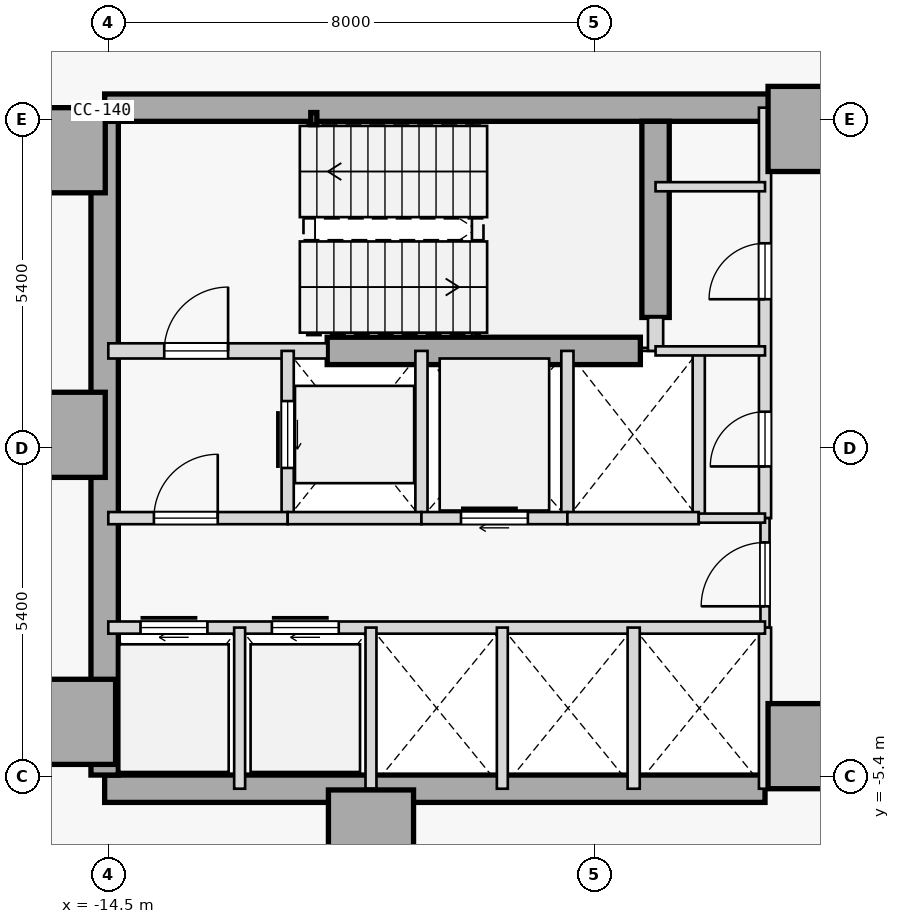
"""IFC4 building model, lengths in metres.
Left out: names, types, materials, properties, quantities, classifications, styles, units other than length and angle.
Written with IfcOpenShell. Run it as: python <this file> out.ifc"""

import sys

from ifc_helpers import new_model, si_unit, direction, frame, frame_2d, origin, origin_2d, place, context, subcontext, project, spatial, rectangle, hollow_rectangle, extrude, element, fill, save


model = new_model("IFC4")
c1 = context("Model", 3, precision=1e-05, world=origin(), true_north=direction((0.0, 1.0)))
c2 = subcontext(c1, "Body", "Model", "MODEL_VIEW")
j1 = project(units=[si_unit("LENGTHUNIT", "METRE"), si_unit("PLANEANGLEUNIT", "RADIAN")], contexts=[c1])
p1 = place(None, origin())
s1 = spatial("IfcSite", under=j1, at=p1, CompositionType="ELEMENT")
p2 = place(p1, origin())
s2 = spatial("IfcBuilding", under=s1, at=p2, CompositionType="ELEMENT")
p3 = place(p2, frame((0.0, 0.0, 59.8)))
s3 = spatial("IfcBuildingStorey", under=s2, at=p3, CompositionType="ELEMENT", Elevation=59.8)
for number, where, z_axis, x_axis in (
    (1, (-15.25, 4.9, 0.0), (0.0, 0.0, 1.0), (1.0, 0.0, 0.0)),
    (2, (-15.25, 0.22, 0.0), (0.0, 0.0, 1.0), (1.0, 0.0, 0.0)),
    (3, (-15.08, -4.5, 0.0), (0.0, 0.0, 1.0), (1.0, 0.0, 0.0)),
    (4, (-10.18, -6.32, 0.0), (0.0, 0.0, 1.0), (1.0, 0.0, 0.0)),
    (5, (-2.95, -4.9, 0.0), (0.0, 0.0, 1.0), (1.0, 0.0, 0.0)),
    (6, (-2.95, 5.25, 0.0), (0.0, 0.0, 1.0), (1.0, 0.0, 0.0)),
):
    element("IfcColumn", number, at=place(p3, frame(where, z_axis=z_axis, x_axis=x_axis)), inside=s3, PredefinedType="COLUMN", context=c2, shape_type="SweptSolid", body=[
        extrude(rectangle(XDim=1.4, YDim=1.4, at=origin_2d()), origin(), (0.0, 0.0, 1.0), 3.8),
    ])
p4 = place(p3, frame((-14.56, 5.6, 0.0), z_axis=(0.0, 0.0, 1.0), x_axis=(1.0, 0.0, 0.0)))
e7 = element("IfcWall", 7, at=p4, inside=s3, PredefinedType="SHEAR", context=c2, shape_type="SweptSolid", body=[
    extrude(rectangle(XDim=11.41, YDim=0.45, at=frame_2d((5.705, 0.0))), origin(), (0.0, 0.0, 1.0), 3.575),
])
p5 = place(p3, frame((-14.56, -5.6, 0.0), z_axis=(0.0, 0.0, 1.0), x_axis=(1.0, 0.0, 0.0)))
e8 = element("IfcWall", 8, at=p5, inside=s3, PredefinedType="SHEAR", context=c2, shape_type="SweptSolid", body=[
    extrude(rectangle(XDim=10.86, YDim=0.45, at=frame_2d((5.43, 0.0))), origin(), (0.0, 0.0, 1.0), 3.575),
])
p6 = place(p3, frame((-14.56, -5.375, 0.0), z_axis=(0.0, 0.0, 1.0), x_axis=(0.0, 1.0, 0.0)))
e9 = element("IfcWall", 9, at=p6, inside=s3, PredefinedType="SHEAR", context=c2, shape_type="SweptSolid", body=[
    extrude(rectangle(XDim=10.75, YDim=0.45, at=frame_2d((5.375, 0.0))), origin(), (0.0, 0.0, 1.0), 3.575),
])
p7 = place(p3, frame((-5.5, 2.15, 0.0), z_axis=(0.0, 0.0, 1.0), x_axis=(0.0, 1.0, 0.0)))
e10 = element("IfcWall", 10, at=p7, inside=s3, PredefinedType="SHEAR", context=c2, shape_type="SweptSolid", body=[
    extrude(rectangle(XDim=3.225, YDim=0.45, at=frame_2d((1.613, 0.0))), origin(), (0.0, 0.0, 1.0), 3.575),
])
p8 = place(p3, frame((-10.9, 1.6, 0.0), z_axis=(0.0, 0.0, 1.0), x_axis=(1.0, 0.0, 0.0)))
e11 = element("IfcWall", 11, at=p8, inside=s3, PredefinedType="SHEAR", context=c2, shape_type="SweptSolid", body=[
    extrude(rectangle(XDim=5.15, YDim=0.45, at=frame_2d((2.575, 0.0))), origin(), (0.0, 0.0, 1.0), 3.575),
])
p9 = place(p3, frame((-11.12, 5.42, 0.0), z_axis=(0.0, 0.0, 1.0), x_axis=(1.0, 0.0, 0.0)))
e12 = element("IfcColumn", 12, at=p9, inside=s3, PredefinedType="COLUMN", context=c2, shape_type="SweptSolid", body=[
    extrude(hollow_rectangle(XDim=0.1, YDim=0.2, WallThickness=0.008, at=origin_2d()), origin(), (0.0, 0.0, 1.0), 3.8),
])
p10 = place(p3, frame((-14.5, 1.6, 0.0), z_axis=(0.0, 0.0, 1.0), x_axis=(1.0, 0.0, 0.0)))
e13 = element("IfcWall", 13, at=p10, inside=s3, PredefinedType="STANDARD", context=c2, shape_type="SweptSolid", body=[
    extrude(rectangle(XDim=3.6, YDim=0.25, at=frame_2d((1.8, 0.0))), origin(), (0.0, 0.0, 1.0), 3.575),
])
p11 = place(p10, frame((0.92, 0.0, 0.0)))
e14 = element("IfcOpeningElement", 14, at=p11, cuts=e13, PredefinedType="OPENING", context=c2, shape_type="SweptSolid", body=[
    extrude(rectangle(XDim=1.05, YDim=2.15, at=frame_2d((0.525, 1.075))), frame((0.0, 0.135, 0.0), z_axis=(0.0, -1.0, 0.0), x_axis=(1.0, 0.0, 0.0)), (0.0, 0.0, 1.0), 0.27),
])
p12 = place(p3, frame((-5.5, 1.6, 0.0), z_axis=(0.0, 0.0, 1.0), x_axis=(0.0, 1.0, 0.0)))
e15 = element("IfcWall", 15, at=p12, inside=s3, PredefinedType="STANDARD", context=c2, shape_type="SweptSolid", body=[
    extrude(rectangle(XDim=0.55, YDim=0.25, at=frame_2d((0.275, 0.0))), origin(), (0.0, 0.0, 1.0), 3.575),
])
p13 = place(p3, frame((-3.7, -1.15, 0.0), z_axis=(0.0, 0.0, 1.0), x_axis=(0.0, 1.0, 0.0)))
e16 = element("IfcWall", 16, at=p13, inside=s3, PredefinedType="STANDARD", context=c2, shape_type="SweptSolid", body=[
    extrude(rectangle(XDim=6.75, YDim=0.2, at=frame_2d((3.375, 0.0))), origin(), (0.0, 0.0, 1.0), 3.575),
])
p14 = place(p13, frame((3.6, 0.0, 0.0)))
e17 = element("IfcOpeningElement", 17, at=p14, cuts=e16, PredefinedType="OPENING", context=c2, shape_type="SweptSolid", body=[
    extrude(rectangle(XDim=0.92, YDim=2.15, at=frame_2d((0.46, 1.075))), frame((0.0, 0.11, 0.0), z_axis=(0.0, -1.0, 0.0), x_axis=(1.0, 0.0, 0.0)), (0.0, 0.0, 1.0), 0.22),
])
p15 = place(p13, frame((0.85, 0.0, 0.0)))
e18 = element("IfcOpeningElement", 18, at=p15, cuts=e16, PredefinedType="OPENING", context=c2, shape_type="SweptSolid", body=[
    extrude(rectangle(XDim=0.9, YDim=2.15, at=frame_2d((0.45, 1.075))), frame((0.0, 0.11, 0.0), z_axis=(0.0, -1.0, 0.0), x_axis=(1.0, 0.0, 0.0)), (0.0, 0.0, 1.0), 0.22),
])
p16 = place(p3, frame((-3.7, -2.95, 0.0), z_axis=(0.0, 0.0, 1.0), x_axis=(0.0, 1.0, 0.0)))
e19 = element("IfcWall", 19, at=p16, inside=s3, PredefinedType="PARTITIONING", context=c2, shape_type="SweptSolid", body=[
    extrude(rectangle(XDim=1.8, YDim=0.15, at=frame_2d((0.9, 0.0))), origin(), (0.0, 0.0, 1.0), 3.575),
])
p17 = place(p16, frame((0.35, 0.0, 0.0)))
e20 = element("IfcOpeningElement", 20, at=p17, cuts=e19, PredefinedType="OPENING", context=c2, shape_type="SweptSolid", body=[
    extrude(rectangle(XDim=1.05, YDim=2.18, at=frame_2d((0.525, 1.09))), frame((0.0, 0.085, 0.0), z_axis=(0.0, -1.0, 0.0), x_axis=(1.0, 0.0, 0.0)), (0.0, 0.0, 1.0), 0.17),
])
p18 = place(p3, frame((-3.7, -5.6, 0.0), z_axis=(0.0, 0.0, 1.0), x_axis=(0.0, 1.0, 0.0)))
e21 = element("IfcWall", 21, at=p18, inside=s3, PredefinedType="STANDARD", context=c2, shape_type="SweptSolid", body=[
    extrude(rectangle(XDim=2.65, YDim=0.2, at=frame_2d((1.325, 0.0))), origin(), (0.0, 0.0, 1.0), 3.575),
])
p19 = place(p3, frame((-11.55, -1.15, 0.0), z_axis=(0.0, 0.0, 1.0), x_axis=(0.0, 1.0, 0.0)))
e22 = element("IfcWall", 22, at=p19, inside=s3, PredefinedType="STANDARD", context=c2, shape_type="SweptSolid", body=[
    extrude(rectangle(XDim=2.75, YDim=0.2, at=frame_2d((1.375, 0.0))), origin(), (0.0, 0.0, 1.0), 3.575),
])
p20 = place(p19, frame((0.825, 0.0, 0.0)))
e23 = element("IfcOpeningElement", 23, at=p20, cuts=e22, PredefinedType="OPENING", context=c2, shape_type="SweptSolid", body=[
    extrude(rectangle(XDim=1.1, YDim=2.15, at=frame_2d((0.55, 1.075))), frame((0.0, 0.11, 0.0), z_axis=(0.0, -1.0, 0.0), x_axis=(1.0, 0.0, 0.0)), (0.0, 0.0, 1.0), 0.22),
])
p21 = place(p3, frame((-9.35, -1.15, 0.0), z_axis=(0.0, 0.0, 1.0), x_axis=(0.0, 1.0, 0.0)))
e24 = element("IfcWall", 24, at=p21, inside=s3, PredefinedType="STANDARD", context=c2, shape_type="SweptSolid", body=[
    extrude(rectangle(XDim=2.75, YDim=0.2, at=frame_2d((1.375, 0.0))), origin(), (0.0, 0.0, 1.0), 3.575),
])
p22 = place(p3, frame((-14.5, -1.15, 0.0), z_axis=(0.0, 0.0, 1.0), x_axis=(1.0, 0.0, 0.0)))
e25 = element("IfcWall", 25, at=p22, inside=s3, PredefinedType="STANDARD", context=c2, shape_type="SweptSolid", body=[
    extrude(rectangle(XDim=2.95, YDim=0.2, at=frame_2d((1.475, 0.0))), origin(), (0.0, 0.0, 1.0), 3.575),
])
p23 = place(p22, frame((0.75, 0.0, 0.0)))
e26 = element("IfcOpeningElement", 26, at=p23, cuts=e25, PredefinedType="OPENING", context=c2, shape_type="SweptSolid", body=[
    extrude(rectangle(XDim=1.05, YDim=2.18, at=frame_2d((0.525, 1.09))), frame((0.0, 0.11, 0.0), z_axis=(0.0, -1.0, 0.0), x_axis=(1.0, 0.0, 0.0)), (0.0, 0.0, 1.0), 0.22),
])
p24 = place(p3, frame((-11.55, -1.15, 0.0), z_axis=(0.0, 0.0, 1.0), x_axis=(1.0, 0.0, 0.0)))
e27 = element("IfcWall", 27, at=p24, inside=s3, PredefinedType="STANDARD", context=c2, shape_type="SweptSolid", body=[
    extrude(rectangle(XDim=2.2, YDim=0.2, at=frame_2d((1.1, 0.0))), origin(), (0.0, 0.0, 1.0), 3.575),
])
p25 = place(p3, frame((-6.95, -1.15, 0.0), z_axis=(0.0, 0.0, 1.0), x_axis=(0.0, 1.0, 0.0)))
e28 = element("IfcWall", 28, at=p25, inside=s3, PredefinedType="STANDARD", context=c2, shape_type="SweptSolid", body=[
    extrude(rectangle(XDim=2.75, YDim=0.2, at=frame_2d((1.375, 0.0))), origin(), (0.0, 0.0, 1.0), 3.575),
])
p26 = place(p3, frame((-9.35, -1.15, 0.0), z_axis=(0.0, 0.0, 1.0), x_axis=(1.0, 0.0, 0.0)))
e29 = element("IfcWall", 29, at=p26, inside=s3, PredefinedType="STANDARD", context=c2, shape_type="SweptSolid", body=[
    extrude(rectangle(XDim=2.4, YDim=0.2, at=frame_2d((1.2, 0.0))), origin(), (0.0, 0.0, 1.0), 3.575),
])
p27 = place(p26, frame((0.65, 0.0, 0.0)))
e30 = element("IfcOpeningElement", 30, at=p27, cuts=e29, PredefinedType="OPENING", context=c2, shape_type="SweptSolid", body=[
    extrude(rectangle(XDim=1.1, YDim=2.15, at=frame_2d((0.55, 1.075))), frame((0.0, 0.11, 0.0), z_axis=(0.0, -1.0, 0.0), x_axis=(1.0, 0.0, 0.0)), (0.0, 0.0, 1.0), 0.22),
])
p28 = place(p3, frame((-4.79, -1.15, 0.0), z_axis=(0.0, 0.0, 1.0), x_axis=(0.0, 1.0, 0.0)))
e31 = element("IfcWall", 31, at=p28, inside=s3, PredefinedType="STANDARD", context=c2, shape_type="SweptSolid", body=[
    extrude(rectangle(XDim=2.75, YDim=0.2, at=frame_2d((1.375, 0.0))), origin(), (0.0, 0.0, 1.0), 3.575),
])
p29 = place(p3, frame((-6.95, -1.15, 0.0), z_axis=(0.0, 0.0, 1.0), x_axis=(1.0, 0.0, 0.0)))
e32 = element("IfcWall", 32, at=p29, inside=s3, PredefinedType="STANDARD", context=c2, shape_type="SweptSolid", body=[
    extrude(rectangle(XDim=2.16, YDim=0.2, at=frame_2d((1.08, 0.0))), origin(), (0.0, 0.0, 1.0), 3.575),
])
p30 = place(p3, frame((-4.79, -1.15, 0.0), z_axis=(0.0, 0.0, 1.0), x_axis=(1.0, 0.0, 0.0)))
e33 = element("IfcWall", 33, at=p30, inside=s3, PredefinedType="PARTITIONING", context=c2, shape_type="SweptSolid", body=[
    extrude(rectangle(XDim=1.09, YDim=0.15, at=frame_2d((0.545, 0.0))), origin(), (0.0, 0.0, 1.0), 3.575),
])
p31 = place(p3, frame((-14.5, -2.95, 0.0), z_axis=(0.0, 0.0, 1.0), x_axis=(1.0, 0.0, 0.0)))
e34 = element("IfcWall", 34, at=p31, inside=s3, PredefinedType="STANDARD", context=c2, shape_type="SweptSolid", body=[
    extrude(rectangle(XDim=10.8, YDim=0.2, at=frame_2d((5.4, 0.0))), origin(), (0.0, 0.0, 1.0), 3.575),
])
p32 = place(p31, frame((0.53, 0.0, 0.0)))
e35 = element("IfcOpeningElement", 35, at=p32, cuts=e34, PredefinedType="OPENING", context=c2, shape_type="SweptSolid", body=[
    extrude(rectangle(XDim=1.1, YDim=2.15, at=frame_2d((0.55, 1.075))), frame((0.0, 0.11, 0.0), z_axis=(0.0, -1.0, 0.0), x_axis=(1.0, 0.0, 0.0)), (0.0, 0.0, 1.0), 0.22),
])
p33 = place(p31, frame((2.69, 0.0, 0.0)))
e36 = element("IfcOpeningElement", 36, at=p33, cuts=e34, PredefinedType="OPENING", context=c2, shape_type="SweptSolid", body=[
    extrude(rectangle(XDim=1.1, YDim=2.15, at=frame_2d((0.55, 1.075))), frame((0.0, 0.11, 0.0), z_axis=(0.0, -1.0, 0.0), x_axis=(1.0, 0.0, 0.0)), (0.0, 0.0, 1.0), 0.22),
])
p34 = place(p3, frame((-5.86, -5.6, 0.0), z_axis=(0.0, 0.0, 1.0), x_axis=(0.0, 1.0, 0.0)))
e37 = element("IfcWall", 37, at=p34, inside=s3, PredefinedType="STANDARD", context=c2, shape_type="SweptSolid", body=[
    extrude(rectangle(XDim=2.65, YDim=0.2, at=frame_2d((1.325, 0.0))), origin(), (0.0, 0.0, 1.0), 3.575),
])
for number, where, z_axis, x_axis in (
    (38, (-12.34, -5.6, 0.0), (0.0, 0.0, 1.0), (0.0, 1.0, 0.0)),
    (39, (-10.18, -5.6, 0.0), (0.0, 0.0, 1.0), (0.0, 1.0, 0.0)),
    (40, (-8.02, -5.6, 0.0), (0.0, 0.0, 1.0), (0.0, 1.0, 0.0)),
):
    element("IfcWall", number, at=place(p3, frame(where, z_axis=z_axis, x_axis=x_axis)), inside=s3, PredefinedType="STANDARD", context=c2, shape_type="SweptSolid", body=[
        extrude(rectangle(XDim=2.65, YDim=0.18, at=frame_2d((1.325, 0.0))), origin(), (0.0, 0.0, 1.0), 3.575),
    ])
for number, where, z_axis, x_axis in (
    (41, (-5.5, 4.3, 0.0), (0.0, 0.0, 1.0), (1.0, 0.0, 0.0)),
    (42, (-5.5, 1.6, 0.0), (0.0, 0.0, 1.0), (1.0, 0.0, 0.0)),
):
    element("IfcWall", number, at=place(p3, frame(where, z_axis=z_axis, x_axis=x_axis)), inside=s3, PredefinedType="PARTITIONING", context=c2, shape_type="SweptSolid", body=[
        extrude(rectangle(XDim=1.8, YDim=0.15, at=frame_2d((0.9, 0.0))), origin(), (0.0, 0.0, 1.0), 3.575),
    ])
p35 = place(p11, origin())
e43 = element("IfcDoor", 43, at=p35, inside=s3, OperationType="SINGLE_SWING_RIGHT", PredefinedType="DOOR", context=c2, shape_type="SweptSolid", body=[
    extrude(rectangle(XDim=1.05, YDim=2.15, at=frame_2d((0.525, 1.075))), frame((0.0, 0.025, 0.0), z_axis=(0.0, -1.0, 0.0), x_axis=(1.0, 0.0, 0.0)), (0.0, 0.0, 1.0), 0.05),
])
fill(e14, e43)
p36 = place(p23, origin())
e44 = element("IfcDoor", 44, at=p36, inside=s3, OperationType="SINGLE_SWING_RIGHT", PredefinedType="DOOR", context=c2, shape_type="SweptSolid", body=[
    extrude(rectangle(XDim=1.05, YDim=2.18, at=frame_2d((0.525, 1.09))), frame((0.0, 0.025, 0.0), z_axis=(0.0, -1.0, 0.0), x_axis=(1.0, 0.0, 0.0)), (0.0, 0.0, 1.0), 0.05),
])
fill(e26, e44)
p37 = place(p17, origin())
e45 = element("IfcDoor", 45, at=p37, inside=s3, OperationType="SINGLE_SWING_LEFT", PredefinedType="DOOR", context=c2, shape_type="SweptSolid", body=[
    extrude(rectangle(XDim=1.05, YDim=2.18, at=frame_2d((0.525, 1.09))), frame((0.0, 0.025, 0.0), z_axis=(0.0, -1.0, 0.0), x_axis=(1.0, 0.0, 0.0)), (0.0, 0.0, 1.0), 0.05),
])
fill(e20, e45)
p38 = place(p20, origin())
e46 = element("IfcDoor", 46, at=p38, inside=s3, OperationType="SLIDING_TO_RIGHT", PredefinedType="DOOR", context=c2, shape_type="SweptSolid", body=[
    extrude(rectangle(XDim=1.1, YDim=2.15, at=frame_2d((0.55, 1.075))), frame((0.0, 0.025, 0.0), z_axis=(0.0, -1.0, 0.0), x_axis=(1.0, 0.0, 0.0)), (0.0, 0.0, 1.0), 0.05),
])
fill(e23, e46)
p39 = place(p27, origin())
e47 = element("IfcDoor", 47, at=p39, inside=s3, OperationType="SLIDING_TO_RIGHT", PredefinedType="DOOR", context=c2, shape_type="SweptSolid", body=[
    extrude(rectangle(XDim=1.1, YDim=2.15, at=frame_2d((0.55, 1.075))), frame((0.0, 0.025, 0.0), z_axis=(0.0, -1.0, 0.0), x_axis=(1.0, 0.0, 0.0)), (0.0, 0.0, 1.0), 0.05),
])
fill(e30, e47)
p40 = place(p32, origin())
e48 = element("IfcDoor", 48, at=p40, inside=s3, OperationType="SLIDING_TO_RIGHT", PredefinedType="DOOR", context=c2, shape_type="SweptSolid", body=[
    extrude(rectangle(XDim=1.1, YDim=2.15, at=frame_2d((0.55, 1.075))), frame((0.0, 0.025, 0.0), z_axis=(0.0, -1.0, 0.0), x_axis=(1.0, 0.0, 0.0)), (0.0, 0.0, 1.0), 0.05),
])
fill(e35, e48)
p41 = place(p33, origin())
e49 = element("IfcDoor", 49, at=p41, inside=s3, OperationType="SLIDING_TO_RIGHT", PredefinedType="DOOR", context=c2, shape_type="SweptSolid", body=[
    extrude(rectangle(XDim=1.1, YDim=2.15, at=frame_2d((0.55, 1.075))), frame((0.0, 0.025, 0.0), z_axis=(0.0, -1.0, 0.0), x_axis=(1.0, 0.0, 0.0)), (0.0, 0.0, 1.0), 0.05),
])
fill(e36, e49)
p42 = place(p14, origin())
e50 = element("IfcDoor", 50, at=p42, inside=s3, OperationType="SINGLE_SWING_LEFT", PredefinedType="DOOR", context=c2, shape_type="SweptSolid", body=[
    extrude(rectangle(XDim=0.92, YDim=2.15, at=frame_2d((0.46, 1.075))), frame((0.0, 0.025, 0.0), z_axis=(0.0, -1.0, 0.0), x_axis=(1.0, 0.0, 0.0)), (0.0, 0.0, 1.0), 0.05),
])
fill(e17, e50)
p43 = place(p15, origin())
e51 = element("IfcDoor", 51, at=p43, inside=s3, OperationType="SINGLE_SWING_LEFT", PredefinedType="DOOR", context=c2, shape_type="SweptSolid", body=[
    extrude(rectangle(XDim=0.9, YDim=2.15, at=frame_2d((0.45, 1.075))), frame((0.0, 0.025, 0.0), z_axis=(0.0, -1.0, 0.0), x_axis=(1.0, 0.0, 0.0)), (0.0, 0.0, 1.0), 0.05),
])
fill(e18, e51)
save(model, sys.argv[1])
